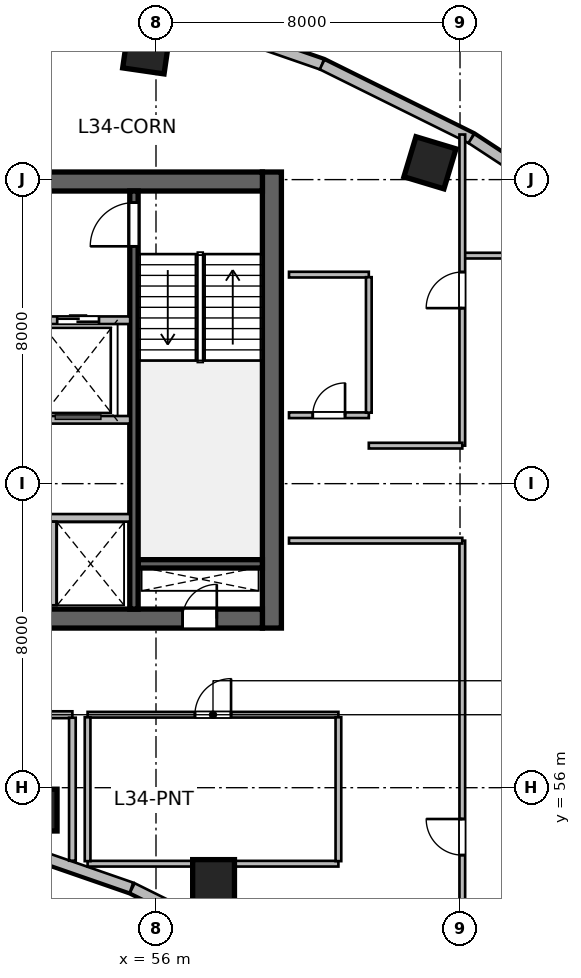
"""IFC4 building model, lengths in metres.
Left out: names, types, materials, properties, quantities, classifications, styles, units other than length and angle.
Written with IfcOpenShell. Run it as: python <this file> out.ifc"""

import sys

from ifc_helpers import new_model, si_unit, direction, frame, frame_2d, origin, origin_2d, place, context, subcontext, project, spatial, rectangle, circle, extrude, source, transform, mapped, element, fill, save


model = new_model("IFC4")
c1 = context("Model", 3, precision=1e-05, world=origin(), true_north=direction((0.0, 1.0)))
c2 = subcontext(c1, "Body", "Model", "MODEL_VIEW")
j1 = project(units=[si_unit("LENGTHUNIT", "METRE"), si_unit("PLANEANGLEUNIT", "RADIAN")], contexts=[c1])
p1 = place(None, origin())
s1 = spatial("IfcSite", under=j1, at=p1, CompositionType="ELEMENT")
p2 = place(p1, origin())
s2 = spatial("IfcBuilding", under=s1, at=p2, CompositionType="ELEMENT")
p3 = place(p2, frame((0.0, 0.0, 142.8)))
s3 = spatial("IfcBuildingStorey", under=s2, at=p3, CompositionType="ELEMENT", Elevation=142.8)
m1 = source(origin(), c2, "Body", "SweptSolid", [
    extrude(rectangle(XDim=12.0, YDim=0.5, at=frame_2d((6.0, 0.0))), origin(), (0.0, 0.0, 1.0), 3.9),
])
p4 = place(p3, frame((59.05, 60.2, 0.0), z_axis=(0.0, 0.0, 1.0), x_axis=(0.0, 1.0, 0.0)))
e1 = element("IfcWall", 1, at=p4, inside=s3, PredefinedType="SHEAR", context=c2, shape_type="MappedRepresentation", body=[
    mapped(m1, transform((0.0, 0.0, 0.0), scale=1.0)),
])
m2 = source(origin(), c2, "Body", "SweptSolid", [
    extrude(rectangle(XDim=21.6, YDim=0.5, at=frame_2d((10.8, 0.0))), origin(), (0.0, 0.0, 1.0), 3.9),
])
p5 = place(p3, frame((37.2, 60.45, 0.0), z_axis=(0.0, 0.0, 1.0), x_axis=(1.0, 0.0, 0.0)))
e2 = element("IfcWall", 2, at=p5, inside=s3, PredefinedType="SHEAR", context=c2, shape_type="MappedRepresentation", body=[
    mapped(m2, transform((0.0, 0.0, 0.0), scale=1.0)),
])
p6 = place(p5, frame((1.1, 0.0, 0.0)))
e3 = element("IfcOpeningElement", 3, at=p6, cuts=e2, PredefinedType="OPENING", context=c2, shape_type="SweptSolid", body=[
    extrude(rectangle(XDim=1.15, YDim=2.15, at=frame_2d((0.575, 1.075))), frame((0.0, 0.26, 0.0), z_axis=(0.0, -1.0, 0.0), x_axis=(1.0, 0.0, 0.0)), (0.0, 0.0, 1.0), 0.52),
])
p7 = place(p5, frame((19.5, 0.0, 0.0)))
e4 = element("IfcOpeningElement", 4, at=p7, cuts=e2, PredefinedType="OPENING", context=c2, shape_type="SweptSolid", body=[
    extrude(rectangle(XDim=0.9, YDim=2.1, at=frame_2d((0.45, 1.05))), frame((0.0, 0.26, 0.0), z_axis=(0.0, -1.0, 0.0), x_axis=(1.0, 0.0, 0.0)), (0.0, 0.0, 1.0), 0.52),
])
p8 = place(p5, frame((12.02, 0.0, 0.0)))
e5 = element("IfcOpeningElement", 5, at=p8, cuts=e2, PredefinedType="OPENING", context=c2, shape_type="SweptSolid", body=[
    extrude(rectangle(XDim=1.6, YDim=2.15, at=frame_2d((0.8, 1.075))), frame((0.0, 0.26, 0.0), z_axis=(0.0, -1.0, 0.0), x_axis=(1.0, 0.0, 0.0)), (0.0, 0.0, 1.0), 0.52),
])
p9 = place(p3, frame((37.2, 71.95, 0.0), z_axis=(0.0, 0.0, 1.0), x_axis=(1.0, 0.0, 0.0)))
e6 = element("IfcWall", 6, at=p9, inside=s3, PredefinedType="SHEAR", context=c2, shape_type="MappedRepresentation", body=[
    mapped(m2, transform((0.0, 0.0, 0.0), scale=1.0)),
])
p10 = place(p9, frame((1.2, 0.0, 0.0)))
e7 = element("IfcOpeningElement", 7, at=p10, cuts=e6, PredefinedType="OPENING", context=c2, shape_type="SweptSolid", body=[
    extrude(rectangle(XDim=0.9, YDim=2.1, at=frame_2d((0.45, 1.05))), frame((0.0, 0.26, 0.0), z_axis=(0.0, -1.0, 0.0), x_axis=(1.0, 0.0, 0.0)), (0.0, 0.0, 1.0), 0.52),
])
p11 = place(p9, frame((14.7, 0.0, 0.0)))
e8 = element("IfcOpeningElement", 8, at=p11, cuts=e6, PredefinedType="OPENING", context=c2, shape_type="SweptSolid", body=[
    extrude(rectangle(XDim=1.2, YDim=2.15, at=frame_2d((0.6, 1.075))), frame((0.0, 0.26, 0.0), z_axis=(0.0, -1.0, 0.0), x_axis=(1.0, 0.0, 0.0)), (0.0, 0.0, 1.0), 0.52),
])
p12 = place(p9, frame((4.15, 0.0, 0.0)))
e9 = element("IfcOpeningElement", 9, at=p12, cuts=e6, PredefinedType="OPENING", context=c2, shape_type="SweptSolid", body=[
    extrude(rectangle(XDim=1.3, YDim=2.15, at=frame_2d((0.65, 1.075))), frame((0.0, 0.26, 0.0), z_axis=(0.0, -1.0, 0.0), x_axis=(1.0, 0.0, 0.0)), (0.0, 0.0, 1.0), 0.52),
])
p13 = place(p9, frame((6.76, 0.0, 0.0)))
e10 = element("IfcOpeningElement", 10, at=p13, cuts=e6, PredefinedType="OPENING", context=c2, shape_type="SweptSolid", body=[
    extrude(rectangle(XDim=0.85, YDim=2.1, at=frame_2d((0.425, 1.05))), frame((0.0, 0.26, 0.0), z_axis=(0.0, -1.0, 0.0), x_axis=(1.0, 0.0, 0.0)), (0.0, 0.0, 1.0), 0.52),
])
p14 = place(p9, frame((8.76, 0.0, 0.0)))
e11 = element("IfcOpeningElement", 11, at=p14, cuts=e6, PredefinedType="OPENING", context=c2, shape_type="SweptSolid", body=[
    extrude(rectangle(XDim=0.85, YDim=2.1, at=frame_2d((0.425, 1.05))), frame((0.0, 0.26, 0.0), z_axis=(0.0, -1.0, 0.0), x_axis=(1.0, 0.0, 0.0)), (0.0, 0.0, 1.0), 0.52),
])
p15 = place(p9, frame((10.725, 0.0, 0.0)))
e12 = element("IfcOpeningElement", 12, at=p15, cuts=e6, PredefinedType="OPENING", context=c2, shape_type="SweptSolid", body=[
    extrude(rectangle(XDim=0.85, YDim=2.1, at=frame_2d((0.425, 1.05))), frame((0.0, 0.26, 0.0), z_axis=(0.0, -1.0, 0.0), x_axis=(1.0, 0.0, 0.0)), (0.0, 0.0, 1.0), 0.52),
])
m3 = source(origin(), c2, "Body", "SweptSolid", [
    extrude(rectangle(XDim=3.27, YDim=0.22, at=frame_2d((1.635, 0.0))), origin(), (0.0, 0.0, 1.0), 3.9),
])
p16 = place(p3, frame((55.53, 61.89, 0.0), z_axis=(0.0, 0.0, 1.0), x_axis=(1.0, 0.0, 0.0)))
e13 = element("IfcWall", 13, at=p16, inside=s3, PredefinedType="SHEAR", context=c2, shape_type="MappedRepresentation", body=[
    mapped(m3, transform((0.0, 0.0, 0.0), scale=1.0)),
])
m4 = source(origin(), c2, "Body", "SweptSolid", [
    extrude(rectangle(XDim=11.0, YDim=0.22, at=frame_2d((5.5, 0.0))), origin(), (0.0, 0.0, 1.0), 3.9),
])
p17 = place(p3, frame((55.42, 60.7, 0.0), z_axis=(0.0, 0.0, 1.0), x_axis=(0.0, 1.0, 0.0)))
e14 = element("IfcWall", 14, at=p17, inside=s3, PredefinedType="SHEAR", context=c2, shape_type="MappedRepresentation", body=[
    mapped(m4, transform((0.0, 0.0, 0.0), scale=1.0)),
])
p18 = place(p17, frame((9.545, 0.0, 0.0)))
e15 = element("IfcOpeningElement", 15, at=p18, cuts=e14, PredefinedType="OPENING", context=c2, shape_type="SweptSolid", body=[
    extrude(rectangle(XDim=1.15, YDim=2.15, at=frame_2d((0.575, 1.075))), frame((0.0, 0.12, 0.0), z_axis=(0.0, -1.0, 0.0), x_axis=(1.0, 0.0, 0.0)), (0.0, 0.0, 1.0), 0.24),
])
m5 = source(origin(), c2, "Body", "SweptSolid", [
    extrude(circle(Radius=0.55, at=origin_2d()), origin(), (0.0, 0.0, 1.0), 3.9),
])
p19 = place(p3, frame((52.846, 55.411, 0.0), z_axis=(0.0, 0.0, 1.0), x_axis=(0.143492621991, 0.98965138682, 0.0)))
e16 = element("IfcColumn", 16, at=p19, inside=s3, PredefinedType="COLUMN", context=c2, shape_type="MappedRepresentation", body=[
    mapped(m5, transform((0.0, 0.0, 0.0), scale=1.0)),
])
m6 = source(origin(), c2, "Body", "SweptSolid", [
    extrude(rectangle(XDim=1.1, YDim=1.1, at=origin_2d()), origin(), (0.0, 0.0, 1.0), 3.9),
])
p20 = place(p3, frame((55.747, 75.404, 0.0), z_axis=(0.0, 0.0, 1.0), x_axis=(0.143492621991, 0.98965138682, 0.0)))
e17 = element("IfcColumn", 17, at=p20, inside=s3, PredefinedType="COLUMN", context=c2, shape_type="MappedRepresentation", body=[
    mapped(m6, transform((0.0, 0.0, 0.0), scale=1.0)),
])
p21 = place(p3, frame((57.515, 53.558, 0.0), z_axis=(0.0, 0.0, 1.0), x_axis=(0.288697611798, 0.957420330337, 0.0)))
e18 = element("IfcColumn", 18, at=p21, inside=s3, PredefinedType="COLUMN", context=c2, shape_type="MappedRepresentation", body=[
    mapped(m5, transform((0.0, 0.0, 0.0), scale=1.0)),
])
p22 = place(p3, frame((63.209, 72.442, 0.0), z_axis=(0.0, 0.0, 1.0), x_axis=(0.288697611798, 0.957420330337, 0.0)))
e19 = element("IfcColumn", 19, at=p22, inside=s3, PredefinedType="COLUMN", context=c2, shape_type="MappedRepresentation", body=[
    mapped(m6, transform((0.0, 0.0, 0.0), scale=1.0)),
])
m7 = source(origin(), c2, "Body", "SweptSolid", [
    extrude(rectangle(XDim=2.584, YDim=0.28, at=frame_2d((1.292, 0.0))), origin(), (0.0, 0.0, 1.0), 3.65),
])
p23 = place(p3, frame((57.692, 52.213, 0.0), z_axis=(0.0, 0.0, 1.0), x_axis=(-0.895989792847, 0.44407464588, 0.0)))
e20 = element("IfcWall", 20, at=p23, inside=s3, PredefinedType="SOLIDWALL", context=c2, shape_type="MappedRepresentation", body=[
    mapped(m7, transform((0.0, 0.0, 0.0), scale=1.0)),
])
m8 = source(origin(), c2, "Body", "SweptSolid", [
    extrude(rectangle(XDim=2.53, YDim=0.28, at=frame_2d((1.265, 0.0))), origin(), (0.0, 0.0, 1.0), 3.65),
])
p24 = place(p3, frame((55.355, 53.37, 0.0), z_axis=(0.0, 0.0, 1.0), x_axis=(-0.944872429646, 0.327438683872, 0.0)))
e21 = element("IfcWall", 21, at=p24, inside=s3, PredefinedType="SOLIDWALL", context=c2, shape_type="MappedRepresentation", body=[
    mapped(m8, transform((0.0, 0.0, 0.0), scale=1.0)),
])
m9 = source(origin(), c2, "Body", "SweptSolid", [
    extrude(rectangle(XDim=4.29, YDim=0.28, at=frame_2d((2.145, 0.0))), origin(), (0.0, 0.0, 1.0), 3.65),
])
p25 = place(p3, frame((56.317, 76.431, 0.0), z_axis=(0.0, 0.0, 1.0), x_axis=(0.944883859218, -0.3274057003, 0.0)))
e22 = element("IfcWall", 22, at=p25, inside=s3, PredefinedType="SOLIDWALL", context=c2, shape_type="MappedRepresentation", body=[
    mapped(m9, transform((0.0, 0.0, 0.0), scale=1.0)),
])
m10 = source(origin(), c2, "Body", "SweptSolid", [
    extrude(rectangle(XDim=4.384, YDim=0.28, at=frame_2d((2.192, 0.0))), origin(), (0.0, 0.0, 1.0), 3.65),
])
p26 = place(p3, frame((60.37, 75.027, 0.0), z_axis=(0.0, 0.0, 1.0), x_axis=(0.895969968053, -0.444114643248, 0.0)))
e23 = element("IfcWall", 23, at=p26, inside=s3, PredefinedType="SOLIDWALL", context=c2, shape_type="MappedRepresentation", body=[
    mapped(m10, transform((0.0, 0.0, 0.0), scale=1.0)),
])
m11 = source(origin(), c2, "Body", "SweptSolid", [
    extrude(rectangle(XDim=4.501, YDim=0.28, at=frame_2d((2.25, 0.0))), origin(), (0.0, 0.0, 1.0), 3.65),
])
p27 = place(p3, frame((64.298, 73.08, 0.0), z_axis=(0.0, 0.0, 1.0), x_axis=(0.835984920737, -0.548752414391, 0.0)))
e24 = element("IfcWall", 24, at=p27, inside=s3, PredefinedType="SOLIDWALL", context=c2, shape_type="MappedRepresentation", body=[
    mapped(m11, transform((0.0, 0.0, 0.0), scale=1.0)),
])
m12 = source(origin(), c2, "Body", "SweptSolid", [
    extrude(rectangle(XDim=5.62, YDim=0.2, at=frame_2d((2.81, 0.0))), origin(), (0.0, 0.0, 1.0), 3.65),
])
p28 = place(p3, frame((49.7, 68.3, 0.0), z_axis=(0.0, 0.0, 1.0), x_axis=(1.0, 0.0, 0.0)))
e25 = element("IfcWall", 25, at=p28, inside=s3, PredefinedType="SOLIDWALL", context=c2, shape_type="MappedRepresentation", body=[
    mapped(m12, transform((0.0, 0.0, 0.0), scale=1.0)),
])
p29 = place(p28, frame((1.6, 0.0, 0.0)))
e26 = element("IfcOpeningElement", 26, at=p29, cuts=e25, PredefinedType="OPENING", context=c2, shape_type="SweptSolid", body=[
    extrude(rectangle(XDim=1.1, YDim=2.15, at=frame_2d((0.55, 1.075))), frame((0.0, 0.11, 0.0), z_axis=(0.0, -1.0, 0.0), x_axis=(1.0, 0.0, 0.0)), (0.0, 0.0, 1.0), 0.22),
])
p30 = place(p28, frame((3.7, 0.0, 0.0)))
e27 = element("IfcOpeningElement", 27, at=p30, cuts=e25, PredefinedType="OPENING", context=c2, shape_type="SweptSolid", body=[
    extrude(rectangle(XDim=1.1, YDim=2.15, at=frame_2d((0.55, 1.075))), frame((0.0, 0.11, 0.0), z_axis=(0.0, -1.0, 0.0), x_axis=(1.0, 0.0, 0.0)), (0.0, 0.0, 1.0), 0.22),
])
p31 = place(p3, frame((49.7, 65.68, 0.0), z_axis=(0.0, 0.0, 1.0), x_axis=(1.0, 0.0, 0.0)))
e28 = element("IfcWall", 28, at=p31, inside=s3, PredefinedType="SOLIDWALL", context=c2, shape_type="MappedRepresentation", body=[
    mapped(m12, transform((0.0, 0.0, 0.0), scale=1.0)),
])
m13 = source(origin(), c2, "Body", "SweptSolid", [
    extrude(rectangle(XDim=4.1, YDim=0.2, at=frame_2d((2.05, 0.0))), origin(), (0.0, 0.0, 1.0), 3.65),
])
p32 = place(p3, frame((51.22, 63.1, 0.0), z_axis=(0.0, 0.0, 1.0), x_axis=(1.0, 0.0, 0.0)))
e29 = element("IfcWall", 29, at=p32, inside=s3, PredefinedType="SOLIDWALL", context=c2, shape_type="MappedRepresentation", body=[
    mapped(m13, transform((0.0, 0.0, 0.0), scale=1.0)),
])
m14 = source(origin(), c2, "Body", "SweptSolid", [
    extrude(rectangle(XDim=2.2, YDim=0.2, at=frame_2d((1.1, 0.0))), origin(), (0.0, 0.0, 1.0), 3.65),
])
p33 = place(p3, frame((53.28, 60.8, 0.0), z_axis=(0.0, 0.0, 1.0), x_axis=(0.0, 1.0, 0.0)))
e30 = element("IfcWall", 30, at=p33, inside=s3, PredefinedType="SOLIDWALL", context=c2, shape_type="MappedRepresentation", body=[
    mapped(m14, transform((0.0, 0.0, 0.0), scale=1.0)),
])
m15 = source(origin(), c2, "Body", "SweptSolid", [
    extrude(rectangle(XDim=2.1, YDim=0.15, at=frame_2d((1.05, 0.0))), origin(), (0.0, 0.0, 1.0), 3.65),
])
p34 = place(p3, frame((59.5, 65.8, 0.0), z_axis=(0.0, 0.0, 1.0), x_axis=(1.0, 0.0, 0.0)))
e31 = element("IfcWall", 31, at=p34, inside=s3, PredefinedType="PARTITIONING", context=c2, shape_type="MappedRepresentation", body=[
    mapped(m15, transform((0.0, 0.0, 0.0), scale=1.0)),
])
p35 = place(p34, frame((0.625, 0.0, 0.0)))
e32 = element("IfcOpeningElement", 32, at=p35, cuts=e31, PredefinedType="OPENING", context=c2, shape_type="SweptSolid", body=[
    extrude(rectangle(XDim=0.85, YDim=2.1, at=frame_2d((0.425, 1.05))), frame((0.0, 0.085, 0.0), z_axis=(0.0, -1.0, 0.0), x_axis=(1.0, 0.0, 0.0)), (0.0, 0.0, 1.0), 0.17),
])
p36 = place(p3, frame((59.5, 69.5, 0.0), z_axis=(0.0, 0.0, 1.0), x_axis=(1.0, 0.0, 0.0)))
e33 = element("IfcWall", 33, at=p36, inside=s3, PredefinedType="PARTITIONING", context=c2, shape_type="MappedRepresentation", body=[
    mapped(m15, transform((0.0, 0.0, 0.0), scale=1.0)),
])
m16 = source(origin(), c2, "Body", "SweptSolid", [
    extrude(rectangle(XDim=3.565, YDim=0.15, at=frame_2d((1.783, 0.0))), origin(), (0.0, 0.0, 1.0), 3.65),
])
p37 = place(p3, frame((61.6, 65.867, 0.0), z_axis=(0.0, 0.0, 1.0), x_axis=(0.0, 1.0, 0.0)))
e34 = element("IfcWall", 34, at=p37, inside=s3, PredefinedType="PARTITIONING", context=c2, shape_type="MappedRepresentation", body=[
    mapped(m16, transform((0.0, 0.0, 0.0), scale=1.0)),
])
m17 = source(origin(), c2, "Body", "SweptSolid", [
    extrude(rectangle(XDim=3.248, YDim=0.18, at=frame_2d((1.624, 0.0))), origin(), (0.0, 0.0, 1.0), 3.65),
])
p38 = place(p3, frame((50.552, 57.92, 0.0), z_axis=(0.0, 0.0, 1.0), x_axis=(1.0, 0.0, 0.0)))
e35 = element("IfcWall", 35, at=p38, inside=s3, PredefinedType="PLUMBINGWALL", context=c2, shape_type="MappedRepresentation", body=[
    mapped(m17, transform((0.0, 0.0, 0.0), scale=1.0)),
])
p39 = place(p38, frame((1.149, 0.0, 0.0)))
e36 = element("IfcOpeningElement", 36, at=p39, cuts=e35, PredefinedType="OPENING", context=c2, shape_type="SweptSolid", body=[
    extrude(rectangle(XDim=0.95, YDim=2.12, at=frame_2d((0.475, 1.06))), frame((0.0, 0.1, 0.0), z_axis=(0.0, -1.0, 0.0), x_axis=(1.0, 0.0, 0.0)), (0.0, 0.0, 1.0), 0.2),
])
m18 = source(origin(), c2, "Body", "SweptSolid", [
    extrude(rectangle(XDim=3.763, YDim=0.175, at=frame_2d((1.881, 0.0))), origin(), (0.0, 0.0, 1.0), 3.65),
])
p40 = place(p3, frame((53.8, 54.079, 0.0), z_axis=(0.0, 0.0, 1.0), x_axis=(0.0, 1.0, 0.0)))
e37 = element("IfcWall", 37, at=p40, inside=s3, PredefinedType="PARTITIONING", context=c2, shape_type="MappedRepresentation", body=[
    mapped(m18, transform((0.0, 0.0, 0.0), scale=1.0)),
])
m19 = source(origin(), c2, "Body", "SweptSolid", [
    extrude(rectangle(XDim=6.6, YDim=0.15, at=frame_2d((3.3, 0.0))), origin(), (0.0, 0.0, 1.0), 3.095),
])
p41 = place(p3, frame((54.2, 54.0, 0.0), z_axis=(0.0, 0.0, 1.0), x_axis=(1.0, 0.0, 0.0)))
e38 = element("IfcWall", 38, at=p41, inside=s3, PredefinedType="PARTITIONING", context=c2, shape_type="MappedRepresentation", body=[
    mapped(m19, transform((0.0, 0.0, 0.0), scale=1.0)),
])
m20 = source(origin(), c2, "Body", "SweptSolid", [
    extrude(rectangle(XDim=6.6, YDim=0.15, at=frame_2d((3.3, 0.0))), origin(), (0.0, 0.0, 1.0), 3.65),
])
p42 = place(p3, frame((54.2, 57.92, 0.0), z_axis=(0.0, 0.0, 1.0), x_axis=(1.0, 0.0, 0.0)))
e39 = element("IfcWall", 39, at=p42, inside=s3, PredefinedType="PARTITIONING", context=c2, shape_type="MappedRepresentation", body=[
    mapped(m20, transform((0.0, 0.0, 0.0), scale=1.0)),
])
p43 = place(p42, frame((2.825, 0.0, 0.0)))
e40 = element("IfcOpeningElement", 40, at=p43, cuts=e39, PredefinedType="OPENING", context=c2, shape_type="SweptSolid", body=[
    extrude(rectangle(XDim=0.95, YDim=2.1, at=frame_2d((0.475, 1.05))), frame((0.0, 0.085, 0.0), z_axis=(0.0, -1.0, 0.0), x_axis=(1.0, 0.0, 0.0)), (0.0, 0.0, 1.0), 0.17),
])
m21 = source(origin(), c2, "Body", "SweptSolid", [
    extrude(rectangle(XDim=3.785, YDim=0.15, at=frame_2d((1.893, 0.0))), origin(), (0.0, 0.0, 1.0), 3.65),
])
for number, where, z_axis, x_axis in (
    (41, (54.2, 54.067, 0.0), (0.0, 0.0, 1.0), (0.0, 1.0, 0.0)),
    (42, (60.8, 54.067, 0.0), (0.0, 0.0, 1.0), (0.0, 1.0, 0.0)),
):
    element("IfcWall", number, at=place(p3, frame(where, z_axis=z_axis, x_axis=x_axis)), inside=s3, PredefinedType="PARTITIONING", context=c2, shape_type="MappedRepresentation", body=[
        mapped(m21, transform((0.0, 0.0, 0.0), scale=1.0)),
    ])
m22 = source(origin(), c2, "Body", "SweptSolid", [
    extrude(rectangle(XDim=2.5, YDim=0.15, at=frame_2d((1.25, 0.0))), origin(), (0.0, 0.0, 1.0), 3.65),
])
p44 = place(p3, frame((64.1, 70.0, 0.0), z_axis=(0.0, 0.0, 1.0), x_axis=(1.0, 0.0, 0.0)))
e43 = element("IfcWall", 43, at=p44, inside=s3, PredefinedType="PARTITIONING", context=c2, shape_type="MappedRepresentation", body=[
    mapped(m22, transform((0.0, 0.0, 0.0), scale=1.0)),
])
m23 = source(origin(), c2, "Body", "SweptSolid", [
    extrude(rectangle(XDim=15.598, YDim=0.15, at=frame_2d((7.799, 0.0))), origin(), (0.0, 0.0, 1.0), 2.942),
])
p45 = place(p3, frame((64.06, 46.902, 0.0), z_axis=(0.0, 0.0, 1.0), x_axis=(0.0, 1.0, 0.0)))
e44 = element("IfcWall", 44, at=p45, inside=s3, PredefinedType="PARTITIONING", context=c2, shape_type="MappedRepresentation", body=[
    mapped(m23, transform((0.0, 0.0, 0.0), scale=1.0)),
])
p46 = place(p45, frame((7.324, 0.0, 0.0)))
e45 = element("IfcOpeningElement", 45, at=p46, cuts=e44, PredefinedType="OPENING", context=c2, shape_type="SweptSolid", body=[
    extrude(rectangle(XDim=0.95, YDim=2.1, at=frame_2d((0.475, 1.05))), frame((0.0, 0.085, 0.0), z_axis=(0.0, -1.0, 0.0), x_axis=(1.0, 0.0, 0.0)), (0.0, 0.0, 1.0), 0.17),
])
m24 = source(origin(), c2, "Body", "SweptSolid", [
    extrude(rectangle(XDim=4.56, YDim=0.15, at=frame_2d((2.28, 0.0))), origin(), (0.0, 0.0, 1.0), 3.65),
])
p47 = place(p3, frame((59.5, 62.5, 0.0), z_axis=(0.0, 0.0, 1.0), x_axis=(1.0, 0.0, 0.0)))
e46 = element("IfcWall", 46, at=p47, inside=s3, PredefinedType="PARTITIONING", context=c2, shape_type="MappedRepresentation", body=[
    mapped(m24, transform((0.0, 0.0, 0.0), scale=1.0)),
])
m25 = source(origin(), c2, "Body", "SweptSolid", [
    extrude(rectangle(XDim=8.187, YDim=0.15, at=frame_2d((4.093, 0.0))), origin(), (0.0, 0.0, 1.0), 3.65),
])
p48 = place(p3, frame((64.06, 65.0, 0.0), z_axis=(0.0, 0.0, 1.0), x_axis=(0.0, 1.0, 0.0)))
e47 = element("IfcWall", 47, at=p48, inside=s3, PredefinedType="PARTITIONING", context=c2, shape_type="MappedRepresentation", body=[
    mapped(m25, transform((0.0, 0.0, 0.0), scale=1.0)),
])
p49 = place(p48, frame((3.618, 0.0, 0.0)))
e48 = element("IfcOpeningElement", 48, at=p49, cuts=e47, PredefinedType="OPENING", context=c2, shape_type="SweptSolid", body=[
    extrude(rectangle(XDim=0.95, YDim=2.1, at=frame_2d((0.475, 1.05))), frame((0.0, 0.085, 0.0), z_axis=(0.0, -1.0, 0.0), x_axis=(1.0, 0.0, 0.0)), (0.0, 0.0, 1.0), 0.17),
])
m26 = source(origin(), c2, "Body", "SweptSolid", [
    extrude(rectangle(XDim=2.46, YDim=0.15, at=frame_2d((1.23, 0.0))), origin(), (0.0, 0.0, 1.0), 3.65),
])
p50 = place(p3, frame((61.6, 65.0, 0.0), z_axis=(0.0, 0.0, 1.0), x_axis=(1.0, 0.0, 0.0)))
e49 = element("IfcWall", 49, at=p50, inside=s3, PredefinedType="PARTITIONING", context=c2, shape_type="MappedRepresentation", body=[
    mapped(m26, transform((0.0, 0.0, 0.0), scale=1.0)),
])
m27 = source(origin(), c2, "Body", "SweptSolid", [
    extrude(rectangle(XDim=0.9, YDim=2.1, at=frame_2d((0.45, 1.05))), frame((0.0, 0.025, 0.0), z_axis=(0.0, -1.0, 0.0), x_axis=(1.0, 0.0, 0.0)), (0.0, 0.0, 1.0), 0.05),
])
p51 = place(p7, origin())
e50 = element("IfcDoor", 50, at=p51, inside=s3, OperationType="SINGLE_SWING_RIGHT", PredefinedType="DOOR", context=c2, shape_type="MappedRepresentation", body=[
    mapped(m27, transform((0.0, 0.0, 0.0), scale=1.0)),
])
fill(e4, e50)
m28 = source(origin(), c2, "Body", "SweptSolid", [
    extrude(rectangle(XDim=1.15, YDim=2.15, at=frame_2d((0.575, 1.075))), frame((0.0, 0.025, 0.0), z_axis=(0.0, -1.0, 0.0), x_axis=(1.0, 0.0, 0.0)), (0.0, 0.0, 1.0), 0.05),
])
p52 = place(p18, origin())
e51 = element("IfcDoor", 51, at=p52, inside=s3, OperationType="SINGLE_SWING_LEFT", PredefinedType="DOOR", context=c2, shape_type="MappedRepresentation", body=[
    mapped(m28, transform((0.0, 0.0, 0.0), scale=1.0)),
])
fill(e15, e51)
m29 = source(origin(), c2, "Body", "SweptSolid", [
    extrude(rectangle(XDim=1.1, YDim=2.15, at=frame_2d((0.55, 1.075))), frame((0.0, 0.025, 0.0), z_axis=(0.0, -1.0, 0.0), x_axis=(1.0, 0.0, 0.0)), (0.0, 0.0, 1.0), 0.05),
])
p53 = place(p30, origin())
e52 = element("IfcDoor", 52, at=p53, inside=s3, OperationType="DOUBLE_DOOR_SLIDING", PredefinedType="DOOR", context=c2, shape_type="MappedRepresentation", body=[
    mapped(m29, transform((0.0, 0.0, 0.0), scale=1.0)),
])
fill(e27, e52)
m30 = source(origin(), c2, "Body", "SweptSolid", [
    extrude(rectangle(XDim=0.85, YDim=2.1, at=frame_2d((0.425, 1.05))), frame((0.0, 0.025, 0.0), z_axis=(0.0, -1.0, 0.0), x_axis=(1.0, 0.0, 0.0)), (0.0, 0.0, 1.0), 0.05),
])
p54 = place(p35, origin())
e53 = element("IfcDoor", 53, at=p54, inside=s3, OperationType="SINGLE_SWING_RIGHT", PredefinedType="DOOR", context=c2, shape_type="MappedRepresentation", body=[
    mapped(m30, transform((0.0, 0.0, 0.0), scale=1.0)),
])
fill(e32, e53)
m31 = source(origin(), c2, "Body", "SweptSolid", [
    extrude(rectangle(XDim=0.95, YDim=2.1, at=frame_2d((0.475, 1.05))), frame((0.0, 0.025, 0.0), z_axis=(0.0, -1.0, 0.0), x_axis=(1.0, 0.0, 0.0)), (0.0, 0.0, 1.0), 0.05),
])
p55 = place(p43, origin())
e54 = element("IfcDoor", 54, at=p55, inside=s3, OperationType="SINGLE_SWING_RIGHT", PredefinedType="DOOR", context=c2, shape_type="MappedRepresentation", body=[
    mapped(m31, transform((0.0, 0.0, 0.0), scale=1.0)),
])
fill(e40, e54)
p56 = place(p46, origin())
e55 = element("IfcDoor", 55, at=p56, inside=s3, OperationType="SINGLE_SWING_RIGHT", PredefinedType="DOOR", context=c2, shape_type="MappedRepresentation", body=[
    mapped(m31, transform((0.0, 0.0, 0.0), scale=1.0)),
])
fill(e45, e55)
p57 = place(p49, origin())
e56 = element("IfcDoor", 56, at=p57, inside=s3, OperationType="SINGLE_SWING_LEFT", PredefinedType="DOOR", context=c2, shape_type="MappedRepresentation", body=[
    mapped(m31, transform((0.0, 0.0, 0.0), scale=1.0)),
])
fill(e48, e56)
save(model, sys.argv[1])
